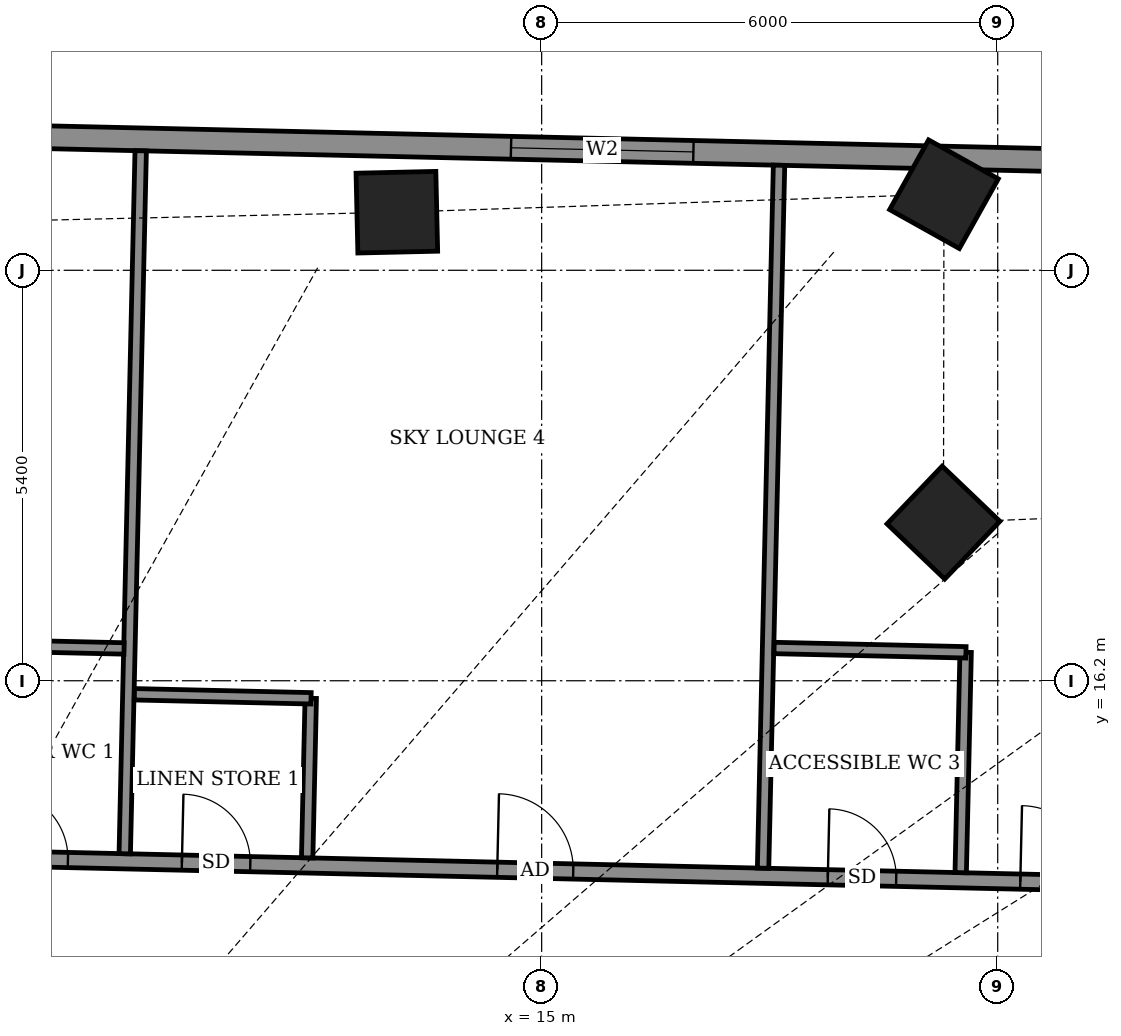
"""IFC4 building model, lengths in metres.
Left out: names, types, materials, properties, quantities, classifications, styles, units other than length and angle.
Written with IfcOpenShell. Run it as: python <this file> out.ifc"""

import sys

from ifc_helpers import new_model, si_unit, direction, frame, frame_2d, origin, origin_2d, place, context, subcontext, project, spatial, rectangle, extrude, element, fill, save


model = new_model("IFC4")
c1 = context("Model", 3, precision=1e-05, world=origin(), true_north=direction((0.0, 1.0)))
c2 = subcontext(c1, "Body", "Model", "MODEL_VIEW")
j1 = project(units=[si_unit("LENGTHUNIT", "METRE"), si_unit("PLANEANGLEUNIT", "RADIAN")], contexts=[c1])
p1 = place(None, origin())
s1 = spatial("IfcSite", under=j1, at=p1, CompositionType="ELEMENT")
p2 = place(p1, origin())
s2 = spatial("IfcBuilding", under=s1, at=p2, CompositionType="ELEMENT")
p3 = place(p2, frame((0.0, 0.0, 252.7)))
s3 = spatial("IfcBuildingStorey", under=s2, at=p3, CompositionType="ELEMENT", Elevation=252.7)
for number, where, z_axis, x_axis in (
    (1, (20.286, 18.281, -0.55), (0.0, 0.0, 1.0), (-0.723, 0.691, 0.0)),
    (2, (20.293, 22.601, -0.55), (0.0, 0.0, 1.0), (-0.873, 0.488, 0.0)),
    (3, (13.095, 22.364, -0.55), (0.0, 0.0, 1.0), (-1.0, -0.023, 0.0)),
):
    element("IfcColumn", number, at=place(p3, frame(where, z_axis=z_axis, x_axis=x_axis)), inside=s3, PredefinedType="COLUMN", context=c2, shape_type="SweptSolid", body=[
        extrude(rectangle(XDim=1.05, YDim=1.05, at=origin_2d()), origin(), (0.0, 0.0, 1.0), 4.6),
    ])
p4 = place(p3, frame((26.35, 22.945, 0.0), z_axis=(0.0, 0.0, 1.0), x_axis=(-0.999742523712, 0.022691105788, 0.0)))
e4 = element("IfcWall", 4, at=p4, inside=s3, PredefinedType="SOLIDWALL", context=c2, shape_type="SweptSolid", body=[
    extrude(rectangle(XDim=47.771, YDim=0.3, at=frame_2d((23.886, 0.0))), origin(), (0.0, 0.0, 1.0), 2.45),
])
p5 = place(p4, frame((1.969, 0.0, 0.0)))
e5 = element("IfcOpeningElement", 5, at=p5, cuts=e4, PredefinedType="OPENING", context=c2, shape_type="SweptSolid", body=[
    extrude(rectangle(XDim=1.5, YDim=2.4, at=frame_2d((0.75, 1.2))), frame((0.0, 0.16, 0.0), z_axis=(0.0, -1.0, 0.0), x_axis=(1.0, 0.0, 0.0)), (0.0, 0.0, 1.0), 0.32),
])
p6 = place(p4, frame((9.356, 0.0, 0.9)))
e6 = element("IfcOpeningElement", 6, at=p6, cuts=e4, PredefinedType="OPENING", context=c2, shape_type="SweptSolid", body=[
    extrude(rectangle(XDim=2.4, YDim=1.5, at=frame_2d((1.2, 0.75))), frame((0.0, 0.16, 0.0), z_axis=(0.0, -1.0, 0.0), x_axis=(1.0, 0.0, 0.0)), (0.0, 0.0, 1.0), 0.32),
])
p7 = place(p4, frame((21.81, 0.0, 0.9)))
e7 = element("IfcOpeningElement", 7, at=p7, cuts=e4, PredefinedType="OPENING", context=c2, shape_type="SweptSolid", body=[
    extrude(rectangle(XDim=2.4, YDim=1.5, at=frame_2d((1.2, 0.75))), frame((0.0, 0.16, 0.0), z_axis=(0.0, -1.0, 0.0), x_axis=(1.0, 0.0, 0.0)), (0.0, 0.0, 1.0), 0.32),
])
p8 = place(p4, frame((25.667, 0.0, 0.0)))
e8 = element("IfcOpeningElement", 8, at=p8, cuts=e4, PredefinedType="OPENING", context=c2, shape_type="SweptSolid", body=[
    extrude(rectangle(XDim=1.5, YDim=2.4, at=frame_2d((0.75, 1.2))), frame((0.0, 0.16, 0.0), z_axis=(0.0, -1.0, 0.0), x_axis=(1.0, 0.0, 0.0)), (0.0, 0.0, 1.0), 0.32),
])
p9 = place(p4, frame((30.997, 0.0, 0.9)))
e9 = element("IfcOpeningElement", 9, at=p9, cuts=e4, PredefinedType="OPENING", context=c2, shape_type="SweptSolid", body=[
    extrude(rectangle(XDim=2.4, YDim=1.5, at=frame_2d((1.2, 0.75))), frame((0.0, 0.16, 0.0), z_axis=(0.0, -1.0, 0.0), x_axis=(1.0, 0.0, 0.0)), (0.0, 0.0, 1.0), 0.32),
])
p10 = place(p4, frame((36.222, 0.0, 0.9)))
e10 = element("IfcOpeningElement", 10, at=p10, cuts=e4, PredefinedType="OPENING", context=c2, shape_type="SweptSolid", body=[
    extrude(rectangle(XDim=2.4, YDim=1.5, at=frame_2d((1.2, 0.75))), frame((0.0, 0.16, 0.0), z_axis=(0.0, -1.0, 0.0), x_axis=(1.0, 0.0, 0.0)), (0.0, 0.0, 1.0), 0.32),
])
p11 = place(p4, frame((42.972, 0.0, 0.9)))
e11 = element("IfcOpeningElement", 11, at=p11, cuts=e4, PredefinedType="OPENING", context=c2, shape_type="SweptSolid", body=[
    extrude(rectangle(XDim=2.4, YDim=1.5, at=frame_2d((1.2, 0.75))), frame((0.0, 0.16, 0.0), z_axis=(0.0, -1.0, 0.0), x_axis=(1.0, 0.0, 0.0)), (0.0, 0.0, 1.0), 0.32),
])
p12 = place(p3, frame((-24.974, 14.607, 0.0), z_axis=(0.0, 0.0, 1.0), x_axis=(0.999742823946, -0.02267787398, 0.0)))
e12 = element("IfcWall", 12, at=p12, inside=s3, PredefinedType="PARTITIONING", context=c2, shape_type="SweptSolid", body=[
    extrude(rectangle(XDim=48.284, YDim=0.2, at=frame_2d((24.142, 0.0))), origin(), (0.0, 0.0, 1.0), 2.45),
])
p13 = place(p12, frame((46.283, 0.0, 0.0)))
e13 = element("IfcOpeningElement", 13, at=p13, cuts=e12, PredefinedType="OPENING", context=c2, shape_type="SweptSolid", body=[
    extrude(rectangle(XDim=1.0, YDim=2.1, at=frame_2d((0.5, 1.05))), frame((0.0, 0.11, 0.0), z_axis=(0.0, -1.0, 0.0), x_axis=(1.0, 0.0, 0.0)), (0.0, 0.0, 1.0), 0.22),
])
p14 = place(p12, frame((43.75, 0.0, 0.0)))
e14 = element("IfcOpeningElement", 14, at=p14, cuts=e12, PredefinedType="OPENING", context=c2, shape_type="SweptSolid", body=[
    extrude(rectangle(XDim=0.9, YDim=2.1, at=frame_2d((0.45, 1.05))), frame((0.0, 0.11, 0.0), z_axis=(0.0, -1.0, 0.0), x_axis=(1.0, 0.0, 0.0)), (0.0, 0.0, 1.0), 0.22),
])
p15 = place(p12, frame((39.4, 0.0, 0.0)))
e15 = element("IfcOpeningElement", 15, at=p15, cuts=e12, PredefinedType="OPENING", context=c2, shape_type="SweptSolid", body=[
    extrude(rectangle(XDim=1.0, YDim=2.1, at=frame_2d((0.5, 1.05))), frame((0.0, 0.11, 0.0), z_axis=(0.0, -1.0, 0.0), x_axis=(1.0, 0.0, 0.0)), (0.0, 0.0, 1.0), 0.22),
])
p16 = place(p12, frame((35.25, 0.0, 0.0)))
e16 = element("IfcOpeningElement", 16, at=p16, cuts=e12, PredefinedType="OPENING", context=c2, shape_type="SweptSolid", body=[
    extrude(rectangle(XDim=0.9, YDim=2.1, at=frame_2d((0.45, 1.05))), frame((0.0, 0.11, 0.0), z_axis=(0.0, -1.0, 0.0), x_axis=(1.0, 0.0, 0.0)), (0.0, 0.0, 1.0), 0.22),
])
p17 = place(p12, frame((28.625, 0.0, 0.0)))
e17 = element("IfcOpeningElement", 17, at=p17, cuts=e12, PredefinedType="OPENING", context=c2, shape_type="SweptSolid", body=[
    extrude(rectangle(XDim=1.0, YDim=2.1, at=frame_2d((0.5, 1.05))), frame((0.0, 0.11, 0.0), z_axis=(0.0, -1.0, 0.0), x_axis=(1.0, 0.0, 0.0)), (0.0, 0.0, 1.0), 0.22),
])
p18 = place(p12, frame((32.85, 0.0, 0.0)))
e18 = element("IfcOpeningElement", 18, at=p18, cuts=e12, PredefinedType="OPENING", context=c2, shape_type="SweptSolid", body=[
    extrude(rectangle(XDim=0.9, YDim=2.1, at=frame_2d((0.45, 1.05))), frame((0.0, 0.11, 0.0), z_axis=(0.0, -1.0, 0.0), x_axis=(1.0, 0.0, 0.0)), (0.0, 0.0, 1.0), 0.22),
])
p19 = place(p12, frame((24.4, 0.0, 0.0)))
e19 = element("IfcOpeningElement", 19, at=p19, cuts=e12, PredefinedType="OPENING", context=c2, shape_type="SweptSolid", body=[
    extrude(rectangle(XDim=0.9, YDim=2.1, at=frame_2d((0.45, 1.05))), frame((0.0, 0.11, 0.0), z_axis=(0.0, -1.0, 0.0), x_axis=(1.0, 0.0, 0.0)), (0.0, 0.0, 1.0), 0.22),
])
p20 = place(p12, frame((17.225, 0.0, 0.0)))
e20 = element("IfcOpeningElement", 20, at=p20, cuts=e12, PredefinedType="OPENING", context=c2, shape_type="SweptSolid", body=[
    extrude(rectangle(XDim=1.0, YDim=2.1, at=frame_2d((0.5, 1.05))), frame((0.0, 0.11, 0.0), z_axis=(0.0, -1.0, 0.0), x_axis=(1.0, 0.0, 0.0)), (0.0, 0.0, 1.0), 0.22),
])
p21 = place(p12, frame((19.5, 0.0, 0.0)))
e21 = element("IfcOpeningElement", 21, at=p21, cuts=e12, PredefinedType="OPENING", context=c2, shape_type="SweptSolid", body=[
    extrude(rectangle(XDim=0.9, YDim=2.1, at=frame_2d((0.45, 1.05))), frame((0.0, 0.11, 0.0), z_axis=(0.0, -1.0, 0.0), x_axis=(1.0, 0.0, 0.0)), (0.0, 0.0, 1.0), 0.22),
])
p22 = place(p12, frame((14.4, 0.0, 0.0)))
e22 = element("IfcOpeningElement", 22, at=p22, cuts=e12, PredefinedType="OPENING", context=c2, shape_type="SweptSolid", body=[
    extrude(rectangle(XDim=1.0, YDim=2.1, at=frame_2d((0.5, 1.05))), frame((0.0, 0.11, 0.0), z_axis=(0.0, -1.0, 0.0), x_axis=(1.0, 0.0, 0.0)), (0.0, 0.0, 1.0), 0.22),
])
p23 = place(p12, frame((11.45, 0.0, 0.0)))
e23 = element("IfcOpeningElement", 23, at=p23, cuts=e12, PredefinedType="OPENING", context=c2, shape_type="SweptSolid", body=[
    extrude(rectangle(XDim=0.9, YDim=2.1, at=frame_2d((0.45, 1.05))), frame((0.0, 0.11, 0.0), z_axis=(0.0, -1.0, 0.0), x_axis=(1.0, 0.0, 0.0)), (0.0, 0.0, 1.0), 0.22),
])
p24 = place(p12, frame((2.95, 0.0, 0.0)))
e24 = element("IfcOpeningElement", 24, at=p24, cuts=e12, PredefinedType="OPENING", context=c2, shape_type="SweptSolid", body=[
    extrude(rectangle(XDim=1.0, YDim=2.1, at=frame_2d((0.5, 1.05))), frame((0.0, 0.11, 0.0), z_axis=(0.0, -1.0, 0.0), x_axis=(1.0, 0.0, 0.0)), (0.0, 0.0, 1.0), 0.22),
])
p25 = place(p12, frame((9.05, 0.0, 0.0)))
e25 = element("IfcOpeningElement", 25, at=p25, cuts=e12, PredefinedType="OPENING", context=c2, shape_type="SweptSolid", body=[
    extrude(rectangle(XDim=0.9, YDim=2.1, at=frame_2d((0.45, 1.05))), frame((0.0, 0.11, 0.0), z_axis=(0.0, -1.0, 0.0), x_axis=(1.0, 0.0, 0.0)), (0.0, 0.0, 1.0), 0.22),
])
p26 = place(p3, frame((9.515, 13.924, 0.0), z_axis=(0.0, 0.0, 1.0), x_axis=(0.022723803418, 0.999741781041, 0.0)))
e26 = element("IfcWall", 26, at=p26, inside=s3, PredefinedType="PARTITIONING", context=c2, shape_type="SweptSolid", body=[
    extrude(rectangle(XDim=9.25, YDim=0.15, at=frame_2d((4.625, 0.0))), origin(), (0.0, 0.0, 1.0), 2.45),
])
p27 = place(p3, frame((11.915, 13.87, 0.0), z_axis=(0.0, 0.0, 1.0), x_axis=(0.022327804475, 0.999750703499, 0.0)))
e27 = element("IfcWall", 27, at=p27, inside=s3, PredefinedType="PARTITIONING", context=c2, shape_type="SweptSolid", body=[
    extrude(rectangle(XDim=2.099, YDim=0.15, at=frame_2d((1.05, 0.0))), origin(), (0.0, 0.0, 1.0), 2.65),
])
p28 = place(p3, frame((17.913, 13.734, 0.0), z_axis=(0.0, 0.0, 1.0), x_axis=(0.022697424684, 0.999742380272, 0.0)))
e28 = element("IfcWall", 28, at=p28, inside=s3, PredefinedType="PARTITIONING", context=c2, shape_type="SweptSolid", body=[
    extrude(rectangle(XDim=9.25, YDim=0.15, at=frame_2d((4.625, 0.0))), origin(), (0.0, 0.0, 1.0), 2.45),
])
p29 = place(p3, frame((20.513, 13.675, 0.0), z_axis=(0.0, 0.0, 1.0), x_axis=(0.022396267458, 0.999749172145, 0.0)))
e29 = element("IfcWall", 29, at=p29, inside=s3, PredefinedType="PARTITIONING", context=c2, shape_type="SweptSolid", body=[
    extrude(rectangle(XDim=2.9, YDim=0.15, at=frame_2d((1.45, 0.0))), origin(), (0.0, 0.0, 1.0), 2.85),
])
p30 = place(p3, frame((9.642, 16.022, 0.0), z_axis=(0.0, 0.0, 1.0), x_axis=(0.999740260747, -0.02279059109, 0.0)))
e30 = element("IfcWall", 30, at=p30, inside=s3, PredefinedType="PARTITIONING", context=c2, shape_type="SweptSolid", body=[
    extrude(rectangle(XDim=2.324, YDim=0.15, at=frame_2d((1.162, 0.0))), origin(), (0.0, 0.0, 1.0), 2.85),
])
p31 = place(p3, frame((7.181, 16.678, 0.0), z_axis=(0.0, 0.0, 1.0), x_axis=(0.99974053329, -0.022778632478, 0.0)))
e31 = element("IfcWall", 31, at=p31, inside=s3, PredefinedType="PARTITIONING", context=c2, shape_type="SweptSolid", body=[
    extrude(rectangle(XDim=2.326, YDim=0.15, at=frame_2d((1.163, 0.0))), origin(), (0.0, 0.0, 1.0), 2.85),
])
p32 = place(p3, frame((18.058, 16.631, 0.0), z_axis=(0.0, 0.0, 1.0), x_axis=(0.99974392816, -0.022629142889, 0.0)))
e32 = element("IfcWall", 32, at=p32, inside=s3, PredefinedType="PARTITIONING", context=c2, shape_type="SweptSolid", body=[
    extrude(rectangle(XDim=2.525, YDim=0.15, at=frame_2d((1.262, 0.0))), origin(), (0.0, 0.0, 1.0), 2.85),
])
p33 = place(p6, origin())
e33 = element("IfcWindow", 33, at=p33, inside=s3, PartitioningType="DOUBLE_PANEL_VERTICAL", PredefinedType="WINDOW", context=c2, shape_type="SweptSolid", body=[
    extrude(rectangle(XDim=2.4, YDim=1.5, at=frame_2d((1.2, 0.75))), frame((0.0, 0.03, 0.0), z_axis=(0.0, -1.0, 0.0), x_axis=(1.0, 0.0, 0.0)), (0.0, 0.0, 1.0), 0.06),
])
fill(e6, e33)
p34 = place(p13, origin())
e34 = element("IfcDoor", 34, at=p34, inside=s3, OperationType="SINGLE_SWING_LEFT", PredefinedType="DOOR", context=c2, shape_type="SweptSolid", body=[
    extrude(rectangle(XDim=1.0, YDim=2.1, at=frame_2d((0.5, 1.05))), frame((0.0, 0.025, 0.0), z_axis=(0.0, -1.0, 0.0), x_axis=(1.0, 0.0, 0.0)), (0.0, 0.0, 1.0), 0.05),
])
fill(e13, e34)
p35 = place(p14, origin())
e35 = element("IfcDoor", 35, at=p35, inside=s3, OperationType="SINGLE_SWING_LEFT", PredefinedType="DOOR", context=c2, shape_type="SweptSolid", body=[
    extrude(rectangle(XDim=0.9, YDim=2.1, at=frame_2d((0.45, 1.05))), frame((0.0, 0.025, 0.0), z_axis=(0.0, -1.0, 0.0), x_axis=(1.0, 0.0, 0.0)), (0.0, 0.0, 1.0), 0.05),
])
fill(e14, e35)
p36 = place(p15, origin())
e36 = element("IfcDoor", 36, at=p36, inside=s3, OperationType="SINGLE_SWING_RIGHT", PredefinedType="DOOR", context=c2, shape_type="SweptSolid", body=[
    extrude(rectangle(XDim=1.0, YDim=2.1, at=frame_2d((0.5, 1.05))), frame((0.0, 0.025, 0.0), z_axis=(0.0, -1.0, 0.0), x_axis=(1.0, 0.0, 0.0)), (0.0, 0.0, 1.0), 0.05),
])
fill(e15, e36)
p37 = place(p16, origin())
e37 = element("IfcDoor", 37, at=p37, inside=s3, OperationType="SINGLE_SWING_RIGHT", PredefinedType="DOOR", context=c2, shape_type="SweptSolid", body=[
    extrude(rectangle(XDim=0.9, YDim=2.1, at=frame_2d((0.45, 1.05))), frame((0.0, 0.025, 0.0), z_axis=(0.0, -1.0, 0.0), x_axis=(1.0, 0.0, 0.0)), (0.0, 0.0, 1.0), 0.05),
])
fill(e16, e37)
p38 = place(p18, origin())
e38 = element("IfcDoor", 38, at=p38, inside=s3, OperationType="SINGLE_SWING_LEFT", PredefinedType="DOOR", context=c2, shape_type="SweptSolid", body=[
    extrude(rectangle(XDim=0.9, YDim=2.1, at=frame_2d((0.45, 1.05))), frame((0.0, 0.025, 0.0), z_axis=(0.0, -1.0, 0.0), x_axis=(1.0, 0.0, 0.0)), (0.0, 0.0, 1.0), 0.05),
])
fill(e18, e38)
save(model, sys.argv[1])
